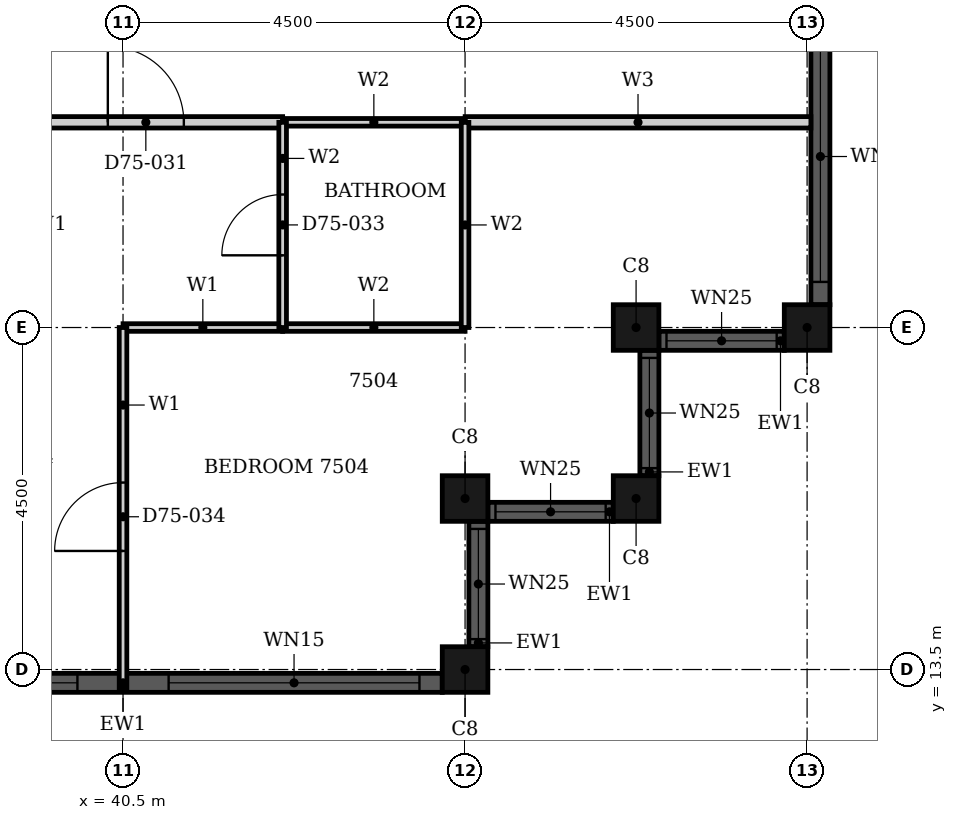
"""IFC4 building model, lengths in metres.
Left out: names, types, materials, properties, quantities, classifications, styles, units other than length and angle.
Written with IfcOpenShell. Run it as: python <this file> out.ifc"""

import sys

from ifc_helpers import new_model, si_unit, direction, frame, frame_2d, origin, origin_2d, place, context, subcontext, project, spatial, rectangle, hollow_rectangle, extrude, element, fill, save


model = new_model("IFC4")
c1 = context("Model", 3, precision=1e-05, world=origin(), true_north=direction((0.0, 1.0)))
c2 = subcontext(c1, "Body", "Model", "MODEL_VIEW")
j1 = project(units=[si_unit("LENGTHUNIT", "METRE"), si_unit("PLANEANGLEUNIT", "RADIAN")], contexts=[c1])
p1 = place(None, origin())
s1 = spatial("IfcSite", under=j1, at=p1, CompositionType="ELEMENT")
p2 = place(p1, origin())
s2 = spatial("IfcBuilding", under=s1, at=p2, CompositionType="ELEMENT")
p3 = place(p2, frame((0.0, 0.0, 294.5)))
s3 = spatial("IfcBuildingStorey", under=s2, at=p3, CompositionType="ELEMENT", Elevation=294.5)
for number, where, z_axis, x_axis in (
    (1, (45.0, 13.5, 0.0), (0.0, 0.0, 1.0), (1.0, 0.0, 0.0)),
    (2, (45.0, 15.75, 0.0), (0.0, 0.0, 1.0), (1.0, 0.0, 0.0)),
    (3, (47.25, 15.75, 0.0), (0.0, 0.0, 1.0), (1.0, 0.0, 0.0)),
    (4, (47.25, 18.0, 0.0), (0.0, 0.0, 1.0), (1.0, 0.0, 0.0)),
    (5, (49.5, 18.0, 0.0), (0.0, 0.0, 1.0), (1.0, 0.0, 0.0)),
):
    element("IfcColumn", number, at=place(p3, frame(where, z_axis=z_axis, x_axis=x_axis)), inside=s3, PredefinedType="COLUMN", context=c2, shape_type="SweptSolid", body=[
        extrude(hollow_rectangle(XDim=0.6, YDim=0.6, WallThickness=0.02, at=origin_2d()), origin(), (0.0, 0.0, 1.0), 3.7),
    ])
p4 = place(p3, frame((45.175, 13.8, 0.0), z_axis=(0.0, 0.0, 1.0), x_axis=(0.0, 1.0, 0.0)))
e6 = element("IfcWall", 6, at=p4, inside=s3, PredefinedType="SOLIDWALL", context=c2, shape_type="SweptSolid", body=[
    extrude(rectangle(XDim=1.65, YDim=0.25, at=frame_2d((0.825, 0.0))), origin(), (0.0, 0.0, 1.0), 3.7),
])
p5 = place(p4, frame((0.1, 0.0, 0.9)))
e7 = element("IfcOpeningElement", 7, at=p5, cuts=e6, PredefinedType="OPENING", context=c2, shape_type="SweptSolid", body=[
    extrude(rectangle(XDim=1.45, YDim=1.85, at=frame_2d((0.725, 0.925))), frame((0.0, 0.135, 0.0), z_axis=(0.0, -1.0, 0.0), x_axis=(1.0, 0.0, 0.0)), (0.0, 0.0, 1.0), 0.27),
])
p6 = place(p3, frame((45.3, 15.575, 0.0), z_axis=(0.0, 0.0, 1.0), x_axis=(1.0, 0.0, 0.0)))
e8 = element("IfcWall", 8, at=p6, inside=s3, PredefinedType="SOLIDWALL", context=c2, shape_type="SweptSolid", body=[
    extrude(rectangle(XDim=1.65, YDim=0.25, at=frame_2d((0.825, 0.0))), origin(), (0.0, 0.0, 1.0), 3.7),
])
p7 = place(p6, frame((0.1, 0.0, 0.9)))
e9 = element("IfcOpeningElement", 9, at=p7, cuts=e8, PredefinedType="OPENING", context=c2, shape_type="SweptSolid", body=[
    extrude(rectangle(XDim=1.45, YDim=1.85, at=frame_2d((0.725, 0.925))), frame((0.0, 0.135, 0.0), z_axis=(0.0, -1.0, 0.0), x_axis=(1.0, 0.0, 0.0)), (0.0, 0.0, 1.0), 0.27),
])
p8 = place(p3, frame((47.425, 16.05, 0.0), z_axis=(0.0, 0.0, 1.0), x_axis=(0.0, 1.0, 0.0)))
e10 = element("IfcWall", 10, at=p8, inside=s3, PredefinedType="SOLIDWALL", context=c2, shape_type="SweptSolid", body=[
    extrude(rectangle(XDim=1.65, YDim=0.25, at=frame_2d((0.825, 0.0))), origin(), (0.0, 0.0, 1.0), 3.7),
])
p9 = place(p8, frame((0.1, 0.0, 0.9)))
e11 = element("IfcOpeningElement", 11, at=p9, cuts=e10, PredefinedType="OPENING", context=c2, shape_type="SweptSolid", body=[
    extrude(rectangle(XDim=1.45, YDim=1.85, at=frame_2d((0.725, 0.925))), frame((0.0, 0.135, 0.0), z_axis=(0.0, -1.0, 0.0), x_axis=(1.0, 0.0, 0.0)), (0.0, 0.0, 1.0), 0.27),
])
p10 = place(p3, frame((47.55, 17.825, 0.0), z_axis=(0.0, 0.0, 1.0), x_axis=(1.0, 0.0, 0.0)))
e12 = element("IfcWall", 12, at=p10, inside=s3, PredefinedType="SOLIDWALL", context=c2, shape_type="SweptSolid", body=[
    extrude(rectangle(XDim=1.65, YDim=0.25, at=frame_2d((0.825, 0.0))), origin(), (0.0, 0.0, 1.0), 3.7),
])
p11 = place(p10, frame((0.1, 0.0, 0.9)))
e13 = element("IfcOpeningElement", 13, at=p11, cuts=e12, PredefinedType="OPENING", context=c2, shape_type="SweptSolid", body=[
    extrude(rectangle(XDim=1.45, YDim=1.85, at=frame_2d((0.725, 0.925))), frame((0.0, 0.135, 0.0), z_axis=(0.0, -1.0, 0.0), x_axis=(1.0, 0.0, 0.0)), (0.0, 0.0, 1.0), 0.27),
])
p12 = place(p3, frame((49.675, 18.3, 0.0), z_axis=(0.0, 0.0, 1.0), x_axis=(0.0, 1.0, 0.0)))
e14 = element("IfcWall", 14, at=p12, inside=s3, PredefinedType="SOLIDWALL", context=c2, shape_type="SweptSolid", body=[
    extrude(rectangle(XDim=8.4, YDim=0.25, at=frame_2d((4.2, 0.0))), origin(), (0.0, 0.0, 1.0), 3.7),
])
p13 = place(p12, frame((0.3, 0.0, 0.45)))
e15 = element("IfcOpeningElement", 15, at=p13, cuts=e14, PredefinedType="OPENING", context=c2, shape_type="SweptSolid", body=[
    extrude(rectangle(XDim=3.3, YDim=2.3, at=frame_2d((1.65, 1.15))), frame((0.0, 0.135, 0.0), z_axis=(0.0, -1.0, 0.0), x_axis=(1.0, 0.0, 0.0)), (0.0, 0.0, 1.0), 0.27),
])
p14 = place(p12, frame((4.8, 0.0, 0.45)))
e16 = element("IfcOpeningElement", 16, at=p14, cuts=e14, PredefinedType="OPENING", context=c2, shape_type="SweptSolid", body=[
    extrude(rectangle(XDim=3.3, YDim=2.3, at=frame_2d((1.65, 1.15))), frame((0.0, 0.135, 0.0), z_axis=(0.0, -1.0, 0.0), x_axis=(1.0, 0.0, 0.0)), (0.0, 0.0, 1.0), 0.27),
])
p15 = place(p3, frame((36.3, 13.325, 0.0), z_axis=(0.0, 0.0, 1.0), x_axis=(1.0, 0.0, 0.0)))
e17 = element("IfcWall", 17, at=p15, inside=s3, PredefinedType="SOLIDWALL", context=c2, shape_type="SweptSolid", body=[
    extrude(rectangle(XDim=8.4, YDim=0.25, at=frame_2d((4.2, 0.0))), origin(), (0.0, 0.0, 1.0), 3.7),
])
p16 = place(p15, frame((0.3, 0.0, 0.45)))
e18 = element("IfcOpeningElement", 18, at=p16, cuts=e17, PredefinedType="OPENING", context=c2, shape_type="SweptSolid", body=[
    extrude(rectangle(XDim=3.3, YDim=2.3, at=frame_2d((1.65, 1.15))), frame((0.0, 0.135, 0.0), z_axis=(0.0, -1.0, 0.0), x_axis=(1.0, 0.0, 0.0)), (0.0, 0.0, 1.0), 0.27),
])
p17 = place(p15, frame((4.8, 0.0, 0.45)))
e19 = element("IfcOpeningElement", 19, at=p17, cuts=e17, PredefinedType="OPENING", context=c2, shape_type="SweptSolid", body=[
    extrude(rectangle(XDim=3.3, YDim=2.3, at=frame_2d((1.65, 1.15))), frame((0.0, 0.135, 0.0), z_axis=(0.0, -1.0, 0.0), x_axis=(1.0, 0.0, 0.0)), (0.0, 0.0, 1.0), 0.27),
])
p18 = place(p3, frame((45.001, 20.7, 0.0), z_axis=(0.0, 0.0, 1.0), x_axis=(1.0, 0.0, 0.0)))
e20 = element("IfcWall", 20, at=p18, inside=s3, PredefinedType="PARTITIONING", context=c2, shape_type="SweptSolid", body=[
    extrude(rectangle(XDim=4.549, YDim=0.15, at=frame_2d((2.274, 0.0))), origin(), (0.0, 0.0, 1.0), 3.4),
])
p19 = place(p3, frame((36.0, 20.7, 0.0), z_axis=(0.0, 0.0, 1.0), x_axis=(1.0, 0.0, 0.0)))
e21 = element("IfcWall", 21, at=p19, inside=s3, PredefinedType="PARTITIONING", context=c2, shape_type="SweptSolid", body=[
    extrude(rectangle(XDim=6.6, YDim=0.15, at=frame_2d((3.3, 0.0))), origin(), (0.0, 0.0, 1.0), 3.4),
])
p20 = place(p19, frame((4.3, 0.0, 0.0)))
e22 = element("IfcOpeningElement", 22, at=p20, cuts=e21, PredefinedType="OPENING", context=c2, shape_type="SweptSolid", body=[
    extrude(rectangle(XDim=1.0, YDim=2.2, at=frame_2d((0.5, 1.1))), frame((0.0, 0.085, 0.0), z_axis=(0.0, -1.0, 0.0), x_axis=(1.0, 0.0, 0.0)), (0.0, 0.0, 1.0), 0.17),
])
p21 = place(p3, frame((40.5, 18.0, 0.0), z_axis=(0.0, 0.0, 1.0), x_axis=(1.0, 0.0, 0.0)))
e23 = element("IfcWall", 23, at=p21, inside=s3, PredefinedType="PARTITIONING", context=c2, shape_type="SweptSolid", body=[
    extrude(rectangle(XDim=2.1, YDim=0.1, at=frame_2d((1.05, 0.0))), origin(), (0.0, 0.0, 1.0), 3.4),
])
p22 = place(p3, frame((40.5, 13.26, 0.0), z_axis=(0.0, 0.0, 1.0), x_axis=(0.0, 1.0, 0.0)))
e24 = element("IfcWall", 24, at=p22, inside=s3, PredefinedType="PARTITIONING", context=c2, shape_type="SweptSolid", body=[
    extrude(rectangle(XDim=4.74, YDim=0.1, at=frame_2d((2.37, 0.0))), origin(), (0.0, 0.0, 1.0), 3.4),
])
p23 = place(p22, frame((1.8, 0.0, 0.0)))
e25 = element("IfcOpeningElement", 25, at=p23, cuts=e24, PredefinedType="OPENING", context=c2, shape_type="SweptSolid", body=[
    extrude(rectangle(XDim=0.9, YDim=2.1, at=frame_2d((0.45, 1.05))), frame((0.0, 0.06, 0.0), z_axis=(0.0, -1.0, 0.0), x_axis=(1.0, 0.0, 0.0)), (0.0, 0.0, 1.0), 0.12),
])
for number, where, z_axis, x_axis in (
    (26, (42.6, 18.0, 0.0), (0.0, 0.0, 1.0), (1.0, 0.0, 0.0)),
    (27, (42.6, 20.7, 0.0), (0.0, 0.0, 1.0), (1.0, 0.0, 0.0)),
):
    element("IfcWall", number, at=place(p3, frame(where, z_axis=z_axis, x_axis=x_axis)), inside=s3, PredefinedType="PARTITIONING", context=c2, shape_type="SweptSolid", body=[
        extrude(rectangle(XDim=2.4, YDim=0.1, at=frame_2d((1.2, 0.0))), origin(), (0.0, 0.0, 1.0), 3.4),
    ])
p24 = place(p3, frame((42.6, 18.0, 0.0), z_axis=(0.0, 0.0, 1.0), x_axis=(0.0, 1.0, 0.0)))
e28 = element("IfcWall", 28, at=p24, inside=s3, PredefinedType="PARTITIONING", context=c2, shape_type="SweptSolid", body=[
    extrude(rectangle(XDim=2.7, YDim=0.1, at=frame_2d((1.35, 0.0))), origin(), (0.0, 0.0, 1.0), 3.4),
])
p25 = place(p24, frame((0.95, 0.0, 0.0)))
e29 = element("IfcOpeningElement", 29, at=p25, cuts=e28, PredefinedType="OPENING", context=c2, shape_type="SweptSolid", body=[
    extrude(rectangle(XDim=0.8, YDim=2.1, at=frame_2d((0.4, 1.05))), frame((0.0, 0.06, 0.0), z_axis=(0.0, -1.0, 0.0), x_axis=(1.0, 0.0, 0.0)), (0.0, 0.0, 1.0), 0.12),
])
p26 = place(p3, frame((45.0, 18.0, 0.0), z_axis=(0.0, 0.0, 1.0), x_axis=(0.0, 1.0, 0.0)))
e30 = element("IfcWall", 30, at=p26, inside=s3, PredefinedType="PARTITIONING", context=c2, shape_type="SweptSolid", body=[
    extrude(rectangle(XDim=2.699, YDim=0.1, at=frame_2d((1.35, 0.0))), origin(), (0.0, 0.0, 1.0), 3.4),
])
p27 = place(p5, origin())
e31 = element("IfcWindow", 31, at=p27, inside=s3, PartitioningType="SINGLE_PANEL", PredefinedType="WINDOW", context=c2, shape_type="SweptSolid", body=[
    extrude(rectangle(XDim=1.45, YDim=1.85, at=frame_2d((0.725, 0.925))), frame((0.0, 0.03, 0.0), z_axis=(0.0, -1.0, 0.0), x_axis=(1.0, 0.0, 0.0)), (0.0, 0.0, 1.0), 0.06),
])
fill(e7, e31)
p28 = place(p7, origin())
e32 = element("IfcWindow", 32, at=p28, inside=s3, PartitioningType="SINGLE_PANEL", PredefinedType="WINDOW", context=c2, shape_type="SweptSolid", body=[
    extrude(rectangle(XDim=1.45, YDim=1.85, at=frame_2d((0.725, 0.925))), frame((0.0, 0.03, 0.0), z_axis=(0.0, -1.0, 0.0), x_axis=(1.0, 0.0, 0.0)), (0.0, 0.0, 1.0), 0.06),
])
fill(e9, e32)
p29 = place(p9, origin())
e33 = element("IfcWindow", 33, at=p29, inside=s3, PartitioningType="SINGLE_PANEL", PredefinedType="WINDOW", context=c2, shape_type="SweptSolid", body=[
    extrude(rectangle(XDim=1.45, YDim=1.85, at=frame_2d((0.725, 0.925))), frame((0.0, 0.03, 0.0), z_axis=(0.0, -1.0, 0.0), x_axis=(1.0, 0.0, 0.0)), (0.0, 0.0, 1.0), 0.06),
])
fill(e11, e33)
p30 = place(p11, origin())
e34 = element("IfcWindow", 34, at=p30, inside=s3, PartitioningType="SINGLE_PANEL", PredefinedType="WINDOW", context=c2, shape_type="SweptSolid", body=[
    extrude(rectangle(XDim=1.45, YDim=1.85, at=frame_2d((0.725, 0.925))), frame((0.0, 0.03, 0.0), z_axis=(0.0, -1.0, 0.0), x_axis=(1.0, 0.0, 0.0)), (0.0, 0.0, 1.0), 0.06),
])
fill(e13, e34)
p31 = place(p13, origin())
e35 = element("IfcWindow", 35, at=p31, inside=s3, PartitioningType="SINGLE_PANEL", PredefinedType="WINDOW", context=c2, shape_type="SweptSolid", body=[
    extrude(rectangle(XDim=3.3, YDim=2.3, at=frame_2d((1.65, 1.15))), frame((0.0, 0.03, 0.0), z_axis=(0.0, -1.0, 0.0), x_axis=(1.0, 0.0, 0.0)), (0.0, 0.0, 1.0), 0.06),
])
fill(e15, e35)
p32 = place(p16, origin())
e36 = element("IfcWindow", 36, at=p32, inside=s3, PartitioningType="SINGLE_PANEL", PredefinedType="WINDOW", context=c2, shape_type="SweptSolid", body=[
    extrude(rectangle(XDim=3.3, YDim=2.3, at=frame_2d((1.65, 1.15))), frame((0.0, 0.03, 0.0), z_axis=(0.0, -1.0, 0.0), x_axis=(1.0, 0.0, 0.0)), (0.0, 0.0, 1.0), 0.06),
])
fill(e18, e36)
p33 = place(p17, origin())
e37 = element("IfcWindow", 37, at=p33, inside=s3, PartitioningType="SINGLE_PANEL", PredefinedType="WINDOW", context=c2, shape_type="SweptSolid", body=[
    extrude(rectangle(XDim=3.3, YDim=2.3, at=frame_2d((1.65, 1.15))), frame((0.0, 0.03, 0.0), z_axis=(0.0, -1.0, 0.0), x_axis=(1.0, 0.0, 0.0)), (0.0, 0.0, 1.0), 0.06),
])
fill(e19, e37)
p34 = place(p20, origin())
e38 = element("IfcDoor", 38, at=p34, inside=s3, OperationType="SINGLE_SWING_LEFT", PredefinedType="DOOR", context=c2, shape_type="SweptSolid", body=[
    extrude(rectangle(XDim=1.0, YDim=2.2, at=frame_2d((0.5, 1.1))), frame((0.0, 0.025, 0.0), z_axis=(0.0, -1.0, 0.0), x_axis=(1.0, 0.0, 0.0)), (0.0, 0.0, 1.0), 0.05),
])
fill(e22, e38)
p35 = place(p25, origin())
e39 = element("IfcDoor", 39, at=p35, inside=s3, OperationType="SINGLE_SWING_LEFT", PredefinedType="DOOR", context=c2, shape_type="SweptSolid", body=[
    extrude(rectangle(XDim=0.8, YDim=2.1, at=frame_2d((0.4, 1.05))), frame((0.0, 0.025, 0.0), z_axis=(0.0, -1.0, 0.0), x_axis=(1.0, 0.0, 0.0)), (0.0, 0.0, 1.0), 0.05),
])
fill(e29, e39)
p36 = place(p23, origin())
e40 = element("IfcDoor", 40, at=p36, inside=s3, OperationType="SINGLE_SWING_RIGHT", PredefinedType="DOOR", context=c2, shape_type="SweptSolid", body=[
    extrude(rectangle(XDim=0.9, YDim=2.1, at=frame_2d((0.45, 1.05))), frame((0.0, 0.025, 0.0), z_axis=(0.0, -1.0, 0.0), x_axis=(1.0, 0.0, 0.0)), (0.0, 0.0, 1.0), 0.05),
])
fill(e25, e40)
save(model, sys.argv[1])
